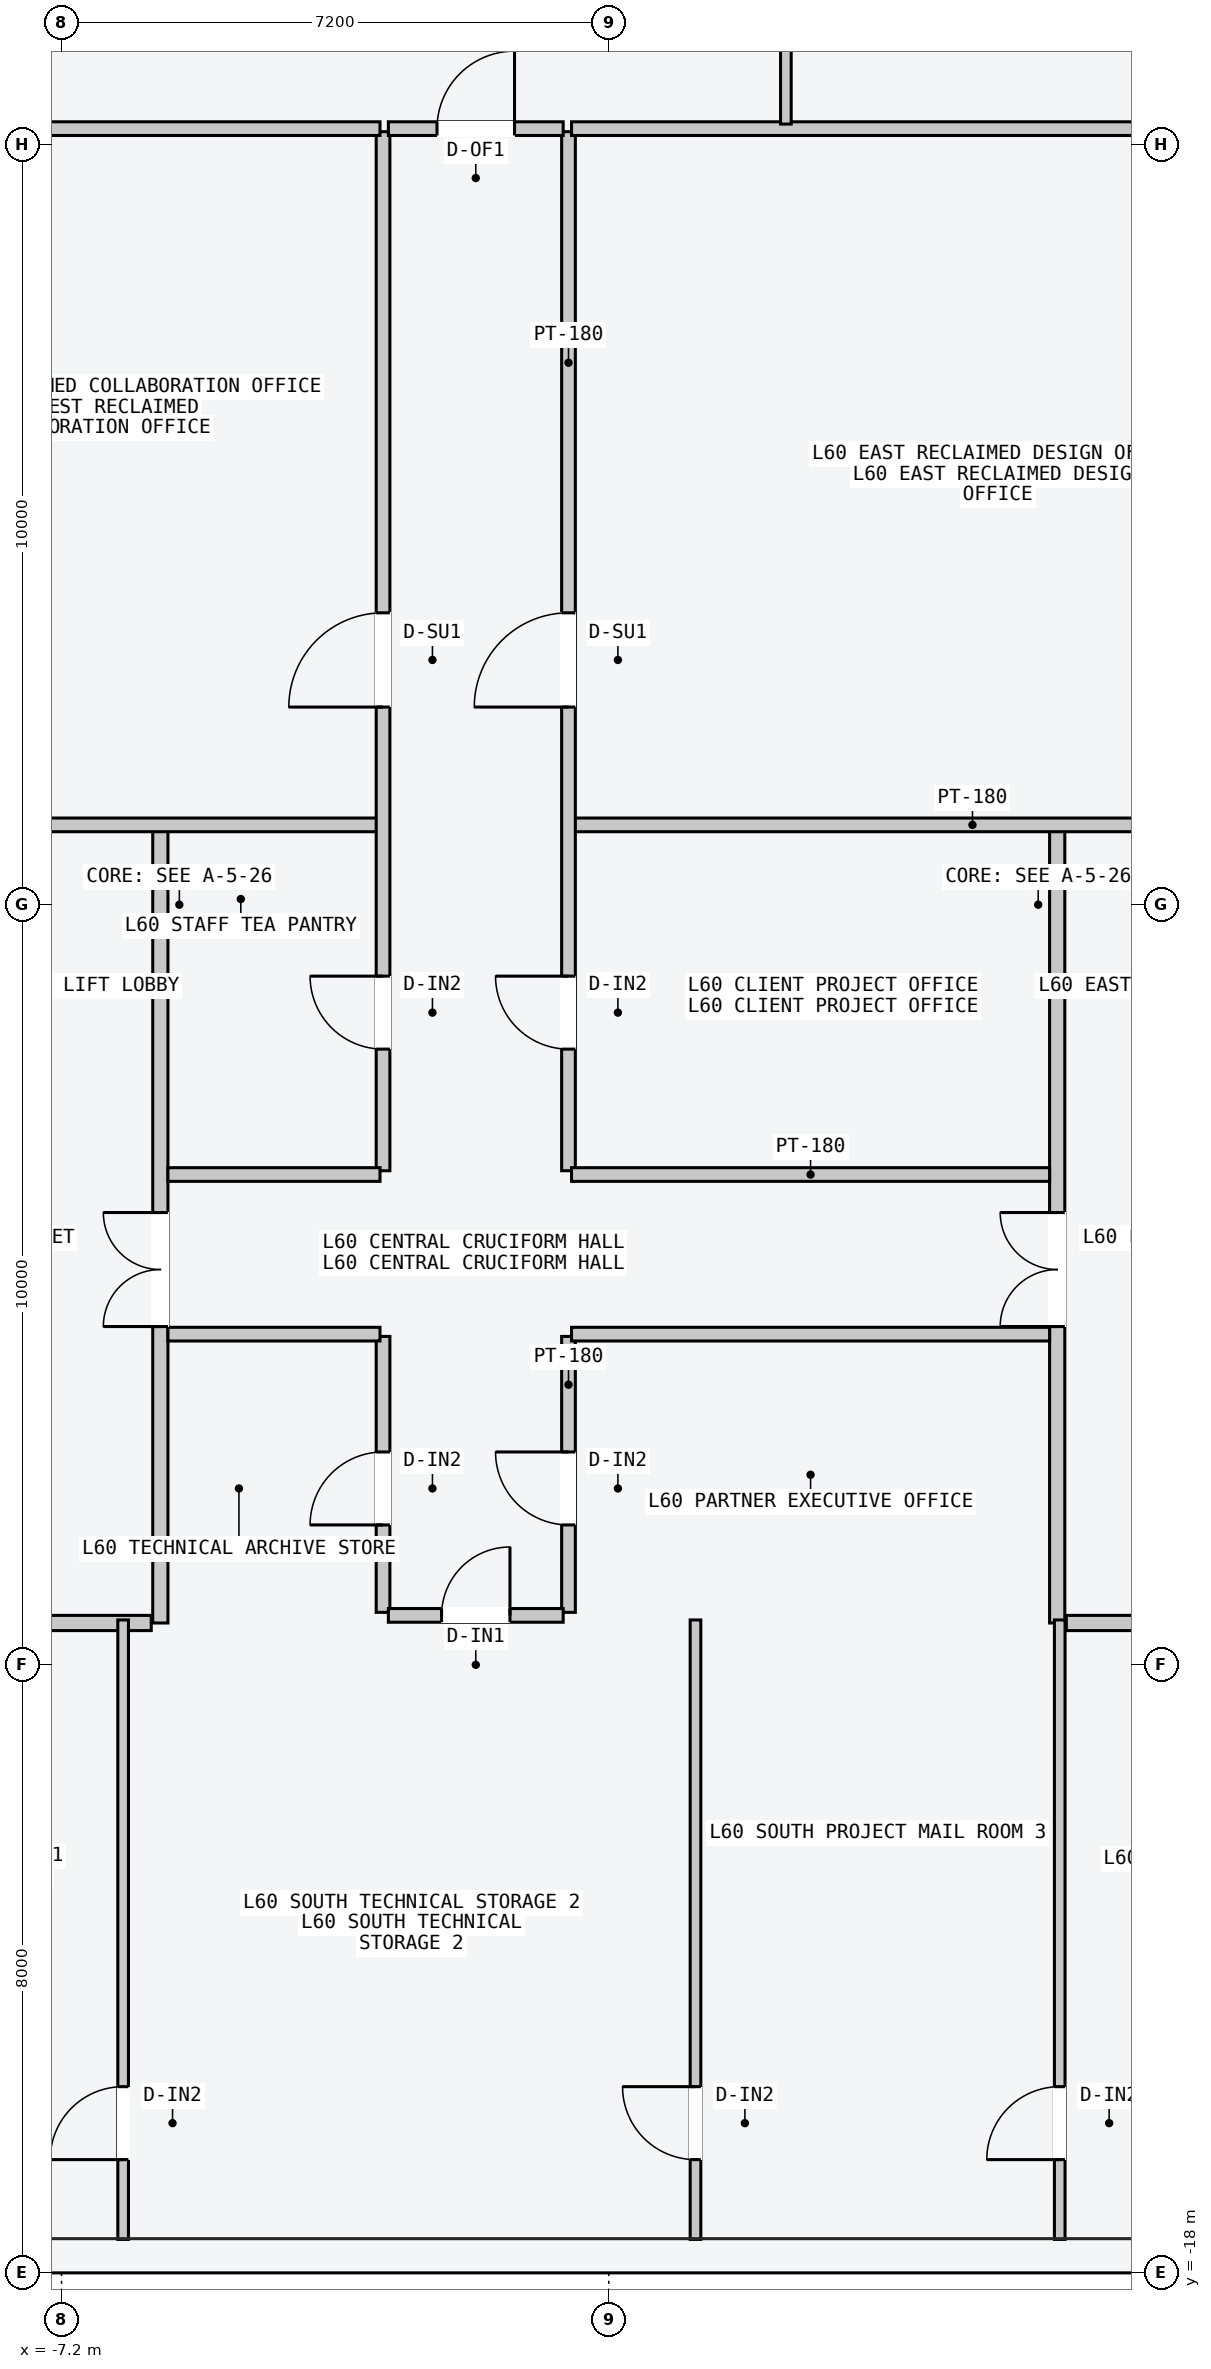
"""IFC4 building model, lengths in metres.
Left out: names, types, materials, properties, quantities, classifications, styles, units other than length and angle.
Written with IfcOpenShell. Run it as: python <this file> out.ifc"""

import sys

from ifc_helpers import new_model, si_unit, direction, frame, frame_2d, origin, place, context, subcontext, project, spatial, rectangle, extrude, element, fill, save


model = new_model("IFC4")
c1 = context("Model", 3, precision=1e-05, world=origin(), true_north=direction((0.0, 1.0)))
c2 = subcontext(c1, "Body", "Model", "MODEL_VIEW")
j1 = project(units=[si_unit("LENGTHUNIT", "METRE"), si_unit("PLANEANGLEUNIT", "RADIAN")], contexts=[c1])
p1 = place(None, origin())
s1 = spatial("IfcSite", under=j1, at=p1, CompositionType="ELEMENT")
p2 = place(p1, origin())
s2 = spatial("IfcBuilding", under=s1, at=p2, CompositionType="ELEMENT")
p3 = place(p2, frame((0.0, 0.0, 229.2)))
s3 = spatial("IfcBuildingStorey", under=s2, at=p3, CompositionType="ELEMENT", Elevation=229.2)
p4 = place(p3, frame((-5.9, -9.45, 0.0), z_axis=(0.0, 0.0, 1.0), x_axis=(0.0, 1.0, 0.0)))
e1 = element("IfcWall", 1, at=p4, inside=s3, PredefinedType="PARTITIONING", context=c2, shape_type="SweptSolid", body=[
    extrude(rectangle(XDim=10.5, YDim=0.2, at=frame_2d((5.25, 0.0))), origin(), (0.0, 0.0, 1.0), 3.4),
])
p5 = place(p4, frame((3.9, 0.0, 0.0)))
e2 = element("IfcOpeningElement", 2, at=p5, cuts=e1, PredefinedType="OPENING", context=c2, shape_type="SweptSolid", body=[
    extrude(rectangle(XDim=1.5, YDim=2.2, at=frame_2d((0.75, 1.1))), frame((0.0, 0.11, 0.0), z_axis=(0.0, -1.0, 0.0), x_axis=(1.0, 0.0, 0.0)), (0.0, 0.0, 1.0), 0.22),
])
p6 = place(p3, frame((-6.02, -9.45, 0.0), z_axis=(0.0, 0.0, 1.0), x_axis=(-1.0, 0.0, 0.0)))
e3 = element("IfcWall", 3, at=p6, inside=s3, PredefinedType="PARTITIONING", context=c2, shape_type="SweptSolid", body=[
    extrude(rectangle(XDim=1.8, YDim=0.2, at=frame_2d((0.9, 0.0))), origin(), (0.0, 0.0, 1.0), 3.4),
])
p7 = place(p3, frame((5.9, -9.45, 0.0), z_axis=(0.0, 0.0, 1.0), x_axis=(0.0, 1.0, 0.0)))
e4 = element("IfcWall", 4, at=p7, inside=s3, PredefinedType="PARTITIONING", context=c2, shape_type="SweptSolid", body=[
    extrude(rectangle(XDim=10.5, YDim=0.2, at=frame_2d((5.25, 0.0))), origin(), (0.0, 0.0, 1.0), 3.4),
])
p8 = place(p7, frame((3.9, 0.0, 0.0)))
e5 = element("IfcOpeningElement", 5, at=p8, cuts=e4, PredefinedType="OPENING", context=c2, shape_type="SweptSolid", body=[
    extrude(rectangle(XDim=1.5, YDim=2.2, at=frame_2d((0.75, 1.1))), frame((0.0, 0.11, 0.0), z_axis=(0.0, -1.0, 0.0), x_axis=(1.0, 0.0, 0.0)), (0.0, 0.0, 1.0), 0.22),
])
p9 = place(p3, frame((6.02, -9.45, 0.0), z_axis=(0.0, 0.0, 1.0), x_axis=(1.0, 0.0, 0.0)))
e6 = element("IfcWall", 6, at=p9, inside=s3, PredefinedType="PARTITIONING", context=c2, shape_type="SweptSolid", body=[
    extrude(rectangle(XDim=1.8, YDim=0.2, at=frame_2d((0.9, 0.0))), origin(), (0.0, 0.0, 1.0), 3.4),
])
p10 = place(p3, frame((-10.05, 1.05, 0.0), z_axis=(0.0, 0.0, 1.0), x_axis=(1.0, 0.0, 0.0)))
e7 = element("IfcWall", 7, at=p10, inside=s3, PredefinedType="PARTITIONING", context=c2, shape_type="SweptSolid", body=[
    extrude(rectangle(XDim=7.04, YDim=0.18, at=frame_2d((3.52, 0.0))), origin(), (0.0, 0.0, 1.0), 3.4),
])
p11 = place(p3, frame((-2.97, -3.5, 0.0), z_axis=(0.0, 0.0, 1.0), x_axis=(0.0, 1.0, 0.0)))
e8 = element("IfcWall", 8, at=p11, inside=s3, PredefinedType="PARTITIONING", context=c2, shape_type="SweptSolid", body=[
    extrude(rectangle(XDim=13.67, YDim=0.18, at=frame_2d((6.835, 0.0))), origin(), (0.0, 0.0, 1.0), 3.4),
])
p12 = place(p11, frame((6.1, 0.0, 0.0)))
e9 = element("IfcOpeningElement", 9, at=p12, cuts=e8, PredefinedType="OPENING", context=c2, shape_type="SweptSolid", body=[
    extrude(rectangle(XDim=1.24, YDim=2.24, at=frame_2d((0.62, 1.12))), frame((0.0, 0.1, 0.0), z_axis=(0.0, -1.0, 0.0), x_axis=(1.0, 0.0, 0.0)), (0.0, 0.0, 1.0), 0.2),
])
p13 = place(p11, frame((1.6, 0.0, 0.0)))
e10 = element("IfcOpeningElement", 10, at=p13, cuts=e8, PredefinedType="OPENING", context=c2, shape_type="SweptSolid", body=[
    extrude(rectangle(XDim=0.96, YDim=2.18, at=frame_2d((0.48, 1.09))), frame((0.0, 0.1, 0.0), z_axis=(0.0, -1.0, 0.0), x_axis=(1.0, 0.0, 0.0)), (0.0, 0.0, 1.0), 0.2),
])
p14 = place(p3, frame((-7.5, 10.21, 0.0), z_axis=(0.0, 0.0, 1.0), x_axis=(1.0, 0.0, 0.0)))
e11 = element("IfcWall", 11, at=p14, inside=s3, PredefinedType="PARTITIONING", context=c2, shape_type="SweptSolid", body=[
    extrude(rectangle(XDim=4.49, YDim=0.18, at=frame_2d((2.245, 0.0))), origin(), (0.0, 0.0, 1.0), 3.4),
])
p15 = place(p3, frame((-5.8, -3.55, 0.0), z_axis=(0.0, 0.0, 1.0), x_axis=(1.0, 0.0, 0.0)))
e12 = element("IfcWall", 12, at=p15, inside=s3, PredefinedType="PARTITIONING", context=c2, shape_type="SweptSolid", body=[
    extrude(rectangle(XDim=2.79, YDim=0.18, at=frame_2d((1.395, 0.0))), origin(), (0.0, 0.0, 1.0), 3.4),
])
p16 = place(p3, frame((-0.49, 1.05, 0.0), z_axis=(0.0, 0.0, 1.0), x_axis=(1.0, 0.0, 0.0)))
e13 = element("IfcWall", 13, at=p16, inside=s3, PredefinedType="PARTITIONING", context=c2, shape_type="SweptSolid", body=[
    extrude(rectangle(XDim=10.55, YDim=0.18, at=frame_2d((5.275, 0.0))), origin(), (0.0, 0.0, 1.0), 3.4),
])
p17 = place(p3, frame((-0.53, -3.5, 0.0), z_axis=(0.0, 0.0, 1.0), x_axis=(0.0, 1.0, 0.0)))
e14 = element("IfcWall", 14, at=p17, inside=s3, PredefinedType="PARTITIONING", context=c2, shape_type="SweptSolid", body=[
    extrude(rectangle(XDim=13.67, YDim=0.18, at=frame_2d((6.835, 0.0))), origin(), (0.0, 0.0, 1.0), 3.4),
])
p18 = place(p17, frame((6.1, 0.0, 0.0)))
e15 = element("IfcOpeningElement", 15, at=p18, cuts=e14, PredefinedType="OPENING", context=c2, shape_type="SweptSolid", body=[
    extrude(rectangle(XDim=1.24, YDim=2.24, at=frame_2d((0.62, 1.12))), frame((0.0, 0.1, 0.0), z_axis=(0.0, -1.0, 0.0), x_axis=(1.0, 0.0, 0.0)), (0.0, 0.0, 1.0), 0.2),
])
p19 = place(p17, frame((1.6, 0.0, 0.0)))
e16 = element("IfcOpeningElement", 16, at=p19, cuts=e14, PredefinedType="OPENING", context=c2, shape_type="SweptSolid", body=[
    extrude(rectangle(XDim=0.96, YDim=2.18, at=frame_2d((0.48, 1.09))), frame((0.0, 0.1, 0.0), z_axis=(0.0, -1.0, 0.0), x_axis=(1.0, 0.0, 0.0)), (0.0, 0.0, 1.0), 0.2),
])
p20 = place(p3, frame((-0.49, 10.21, 0.0), z_axis=(0.0, 0.0, 1.0), x_axis=(1.0, 0.0, 0.0)))
e17 = element("IfcWall", 17, at=p20, inside=s3, PredefinedType="PARTITIONING", context=c2, shape_type="SweptSolid", body=[
    extrude(rectangle(XDim=7.99, YDim=0.18, at=frame_2d((3.995, 0.0))), origin(), (0.0, 0.0, 1.0), 3.4),
])
p21 = place(p3, frame((-0.49, -3.55, 0.0), z_axis=(0.0, 0.0, 1.0), x_axis=(1.0, 0.0, 0.0)))
e18 = element("IfcWall", 18, at=p21, inside=s3, PredefinedType="PARTITIONING", context=c2, shape_type="SweptSolid", body=[
    extrude(rectangle(XDim=6.29, YDim=0.18, at=frame_2d((3.145, 0.0))), origin(), (0.0, 0.0, 1.0), 3.4),
])
p22 = place(p3, frame((-2.97, -9.31, 0.0), z_axis=(0.0, 0.0, 1.0), x_axis=(0.0, 1.0, 0.0)))
e19 = element("IfcWall", 19, at=p22, inside=s3, PredefinedType="PARTITIONING", context=c2, shape_type="SweptSolid", body=[
    extrude(rectangle(XDim=3.63, YDim=0.18, at=frame_2d((1.815, 0.0))), origin(), (0.0, 0.0, 1.0), 3.4),
])
p23 = place(p22, frame((1.15, 0.0, 0.0)))
e20 = element("IfcOpeningElement", 20, at=p23, cuts=e19, PredefinedType="OPENING", context=c2, shape_type="SweptSolid", body=[
    extrude(rectangle(XDim=0.96, YDim=2.18, at=frame_2d((0.48, 1.09))), frame((0.0, 0.1, 0.0), z_axis=(0.0, -1.0, 0.0), x_axis=(1.0, 0.0, 0.0)), (0.0, 0.0, 1.0), 0.2),
])
p24 = place(p3, frame((-0.53, -9.31, 0.0), z_axis=(0.0, 0.0, 1.0), x_axis=(0.0, 1.0, 0.0)))
e21 = element("IfcWall", 21, at=p24, inside=s3, PredefinedType="PARTITIONING", context=c2, shape_type="SweptSolid", body=[
    extrude(rectangle(XDim=3.63, YDim=0.18, at=frame_2d((1.815, 0.0))), origin(), (0.0, 0.0, 1.0), 3.4),
])
p25 = place(p24, frame((1.15, 0.0, 0.0)))
e22 = element("IfcOpeningElement", 22, at=p25, cuts=e21, PredefinedType="OPENING", context=c2, shape_type="SweptSolid", body=[
    extrude(rectangle(XDim=0.96, YDim=2.18, at=frame_2d((0.48, 1.09))), frame((0.0, 0.1, 0.0), z_axis=(0.0, -1.0, 0.0), x_axis=(1.0, 0.0, 0.0)), (0.0, 0.0, 1.0), 0.2),
])
p26 = place(p3, frame((-5.8, -5.65, 0.0), z_axis=(0.0, 0.0, 1.0), x_axis=(1.0, 0.0, 0.0)))
e23 = element("IfcWall", 23, at=p26, inside=s3, PredefinedType="PARTITIONING", context=c2, shape_type="SweptSolid", body=[
    extrude(rectangle(XDim=2.79, YDim=0.18, at=frame_2d((1.395, 0.0))), origin(), (0.0, 0.0, 1.0), 3.4),
])
p27 = place(p3, frame((-0.49, -5.65, 0.0), z_axis=(0.0, 0.0, 1.0), x_axis=(1.0, 0.0, 0.0)))
e24 = element("IfcWall", 24, at=p27, inside=s3, PredefinedType="PARTITIONING", context=c2, shape_type="SweptSolid", body=[
    extrude(rectangle(XDim=6.29, YDim=0.18, at=frame_2d((3.145, 0.0))), origin(), (0.0, 0.0, 1.0), 3.4),
])
p28 = place(p3, frame((2.33, 10.27, 0.0), z_axis=(0.0, 0.0, 1.0), x_axis=(0.0, 1.0, 0.0)))
e25 = element("IfcWall", 25, at=p28, inside=s3, PredefinedType="PARTITIONING", context=c2, shape_type="SweptSolid", body=[
    extrude(rectangle(XDim=6.28, YDim=0.14, at=frame_2d((3.14, 0.0))), origin(), (0.0, 0.0, 1.0), 3.4),
])
p29 = place(p28, frame((1.15, 0.0, 0.0)))
e26 = element("IfcOpeningElement", 26, at=p29, cuts=e25, PredefinedType="OPENING", context=c2, shape_type="SweptSolid", body=[
    extrude(rectangle(XDim=0.96, YDim=2.18, at=frame_2d((0.48, 1.09))), frame((0.0, 0.08, 0.0), z_axis=(0.0, -1.0, 0.0), x_axis=(1.0, 0.0, 0.0)), (0.0, 0.0, 1.0), 0.16),
])
p30 = place(p3, frame((-2.9, 10.21, 0.0), z_axis=(0.0, 0.0, 1.0), x_axis=(1.0, 0.0, 0.0)))
e27 = element("IfcWall", 27, at=p30, inside=s3, PredefinedType="PARTITIONING", context=c2, shape_type="SweptSolid", body=[
    extrude(rectangle(XDim=2.3, YDim=0.18, at=frame_2d((1.15, 0.0))), origin(), (0.0, 0.0, 1.0), 3.4),
])
p31 = place(p30, frame((0.64, 0.0, 0.0)))
e28 = element("IfcOpeningElement", 28, at=p31, cuts=e27, PredefinedType="OPENING", context=c2, shape_type="SweptSolid", body=[
    extrude(rectangle(XDim=1.02, YDim=2.2, at=frame_2d((0.51, 1.1))), frame((0.0, 0.1, 0.0), z_axis=(0.0, -1.0, 0.0), x_axis=(1.0, 0.0, 0.0)), (0.0, 0.0, 1.0), 0.2),
])
p32 = place(p3, frame((-6.39, -17.56, 0.0), z_axis=(0.0, 0.0, 1.0), x_axis=(0.0, 1.0, 0.0)))
e29 = element("IfcWall", 29, at=p32, inside=s3, PredefinedType="PARTITIONING", context=c2, shape_type="SweptSolid", body=[
    extrude(rectangle(XDim=8.15, YDim=0.14, at=frame_2d((4.075, 0.0))), origin(), (0.0, 0.0, 1.0), 3.4),
])
p33 = place(p32, frame((1.05, 0.0, 0.0)))
e30 = element("IfcOpeningElement", 30, at=p33, cuts=e29, PredefinedType="OPENING", context=c2, shape_type="SweptSolid", body=[
    extrude(rectangle(XDim=0.96, YDim=2.18, at=frame_2d((0.48, 1.09))), frame((0.0, 0.08, 0.0), z_axis=(0.0, -1.0, 0.0), x_axis=(1.0, 0.0, 0.0)), (0.0, 0.0, 1.0), 0.16),
])
p34 = place(p3, frame((1.141, -17.56, 0.0), z_axis=(0.0, 0.0, 1.0), x_axis=(0.0, 1.0, 0.0)))
e31 = element("IfcWall", 31, at=p34, inside=s3, PredefinedType="PARTITIONING", context=c2, shape_type="SweptSolid", body=[
    extrude(rectangle(XDim=8.15, YDim=0.14, at=frame_2d((4.075, 0.0))), origin(), (0.0, 0.0, 1.0), 3.4),
])
p35 = place(p34, frame((1.05, 0.0, 0.0)))
e32 = element("IfcOpeningElement", 32, at=p35, cuts=e31, PredefinedType="OPENING", context=c2, shape_type="SweptSolid", body=[
    extrude(rectangle(XDim=0.96, YDim=2.18, at=frame_2d((0.48, 1.09))), frame((0.0, 0.08, 0.0), z_axis=(0.0, -1.0, 0.0), x_axis=(1.0, 0.0, 0.0)), (0.0, 0.0, 1.0), 0.16),
])
p36 = place(p3, frame((5.933, -17.56, 0.0), z_axis=(0.0, 0.0, 1.0), x_axis=(0.0, 1.0, 0.0)))
e33 = element("IfcWall", 33, at=p36, inside=s3, PredefinedType="PARTITIONING", context=c2, shape_type="SweptSolid", body=[
    extrude(rectangle(XDim=8.15, YDim=0.14, at=frame_2d((4.075, 0.0))), origin(), (0.0, 0.0, 1.0), 3.4),
])
p37 = place(p36, frame((1.05, 0.0, 0.0)))
e34 = element("IfcOpeningElement", 34, at=p37, cuts=e33, PredefinedType="OPENING", context=c2, shape_type="SweptSolid", body=[
    extrude(rectangle(XDim=0.96, YDim=2.18, at=frame_2d((0.48, 1.09))), frame((0.0, 0.08, 0.0), z_axis=(0.0, -1.0, 0.0), x_axis=(1.0, 0.0, 0.0)), (0.0, 0.0, 1.0), 0.16),
])
p38 = place(p3, frame((-2.9, -9.35, 0.0), z_axis=(0.0, 0.0, 1.0), x_axis=(1.0, 0.0, 0.0)))
e35 = element("IfcWall", 35, at=p38, inside=s3, PredefinedType="PARTITIONING", context=c2, shape_type="SweptSolid", body=[
    extrude(rectangle(XDim=2.3, YDim=0.18, at=frame_2d((1.15, 0.0))), origin(), (0.0, 0.0, 1.0), 3.4),
])
p39 = place(p38, frame((0.7, 0.0, 0.0)))
e36 = element("IfcOpeningElement", 36, at=p39, cuts=e35, PredefinedType="OPENING", context=c2, shape_type="SweptSolid", body=[
    extrude(rectangle(XDim=0.9, YDim=2.15, at=frame_2d((0.45, 1.075))), frame((0.0, 0.1, 0.0), z_axis=(0.0, -1.0, 0.0), x_axis=(1.0, 0.0, 0.0)), (0.0, 0.0, 1.0), 0.2),
])
p40 = place(p5, origin())
e37 = element("IfcDoor", 37, at=p40, inside=s3, OperationType="DOUBLE_DOOR_SINGLE_SWING", PredefinedType="DOOR", context=c2, shape_type="SweptSolid", body=[
    extrude(rectangle(XDim=1.5, YDim=2.2, at=frame_2d((0.75, 1.1))), frame((0.0, 0.025, 0.0), z_axis=(0.0, -1.0, 0.0), x_axis=(1.0, 0.0, 0.0)), (0.0, 0.0, 1.0), 0.05),
])
fill(e2, e37)
p41 = place(p8, origin())
e38 = element("IfcDoor", 38, at=p41, inside=s3, OperationType="DOUBLE_DOOR_SINGLE_SWING", PredefinedType="DOOR", context=c2, shape_type="SweptSolid", body=[
    extrude(rectangle(XDim=1.5, YDim=2.2, at=frame_2d((0.75, 1.1))), frame((0.0, 0.025, 0.0), z_axis=(0.0, -1.0, 0.0), x_axis=(1.0, 0.0, 0.0)), (0.0, 0.0, 1.0), 0.05),
])
fill(e5, e38)
p42 = place(p12, origin())
e39 = element("IfcDoor", 39, at=p42, inside=s3, OperationType="SINGLE_SWING_LEFT", PredefinedType="DOOR", context=c2, shape_type="SweptSolid", body=[
    extrude(rectangle(XDim=1.24, YDim=2.24, at=frame_2d((0.62, 1.12))), frame((0.0, 0.025, 0.0), z_axis=(0.0, -1.0, 0.0), x_axis=(1.0, 0.0, 0.0)), (0.0, 0.0, 1.0), 0.05),
])
fill(e9, e39)
p43 = place(p13, origin())
e40 = element("IfcDoor", 40, at=p43, inside=s3, OperationType="SINGLE_SWING_RIGHT", PredefinedType="DOOR", context=c2, shape_type="SweptSolid", body=[
    extrude(rectangle(XDim=0.96, YDim=2.18, at=frame_2d((0.48, 1.09))), frame((0.0, 0.025, 0.0), z_axis=(0.0, -1.0, 0.0), x_axis=(1.0, 0.0, 0.0)), (0.0, 0.0, 1.0), 0.05),
])
fill(e10, e40)
p44 = place(p18, origin())
e41 = element("IfcDoor", 41, at=p44, inside=s3, OperationType="SINGLE_SWING_LEFT", PredefinedType="DOOR", context=c2, shape_type="SweptSolid", body=[
    extrude(rectangle(XDim=1.24, YDim=2.24, at=frame_2d((0.62, 1.12))), frame((0.0, 0.025, 0.0), z_axis=(0.0, -1.0, 0.0), x_axis=(1.0, 0.0, 0.0)), (0.0, 0.0, 1.0), 0.05),
])
fill(e15, e41)
p45 = place(p19, origin())
e42 = element("IfcDoor", 42, at=p45, inside=s3, OperationType="SINGLE_SWING_RIGHT", PredefinedType="DOOR", context=c2, shape_type="SweptSolid", body=[
    extrude(rectangle(XDim=0.96, YDim=2.18, at=frame_2d((0.48, 1.09))), frame((0.0, 0.025, 0.0), z_axis=(0.0, -1.0, 0.0), x_axis=(1.0, 0.0, 0.0)), (0.0, 0.0, 1.0), 0.05),
])
fill(e16, e42)
p46 = place(p23, origin())
e43 = element("IfcDoor", 43, at=p46, inside=s3, OperationType="SINGLE_SWING_LEFT", PredefinedType="DOOR", context=c2, shape_type="SweptSolid", body=[
    extrude(rectangle(XDim=0.96, YDim=2.18, at=frame_2d((0.48, 1.09))), frame((0.0, 0.025, 0.0), z_axis=(0.0, -1.0, 0.0), x_axis=(1.0, 0.0, 0.0)), (0.0, 0.0, 1.0), 0.05),
])
fill(e20, e43)
p47 = place(p25, origin())
e44 = element("IfcDoor", 44, at=p47, inside=s3, OperationType="SINGLE_SWING_RIGHT", PredefinedType="DOOR", context=c2, shape_type="SweptSolid", body=[
    extrude(rectangle(XDim=0.96, YDim=2.18, at=frame_2d((0.48, 1.09))), frame((0.0, 0.025, 0.0), z_axis=(0.0, -1.0, 0.0), x_axis=(1.0, 0.0, 0.0)), (0.0, 0.0, 1.0), 0.05),
])
fill(e22, e44)
p48 = place(p31, origin())
e45 = element("IfcDoor", 45, at=p48, inside=s3, OperationType="SINGLE_SWING_RIGHT", PredefinedType="DOOR", context=c2, shape_type="SweptSolid", body=[
    extrude(rectangle(XDim=1.02, YDim=2.2, at=frame_2d((0.51, 1.1))), frame((0.0, 0.025, 0.0), z_axis=(0.0, -1.0, 0.0), x_axis=(1.0, 0.0, 0.0)), (0.0, 0.0, 1.0), 0.05),
])
fill(e28, e45)
p49 = place(p33, origin())
e46 = element("IfcDoor", 46, at=p49, inside=s3, OperationType="SINGLE_SWING_LEFT", PredefinedType="DOOR", context=c2, shape_type="SweptSolid", body=[
    extrude(rectangle(XDim=0.96, YDim=2.18, at=frame_2d((0.48, 1.09))), frame((0.0, 0.025, 0.0), z_axis=(0.0, -1.0, 0.0), x_axis=(1.0, 0.0, 0.0)), (0.0, 0.0, 1.0), 0.05),
])
fill(e30, e46)
p50 = place(p35, origin())
e47 = element("IfcDoor", 47, at=p50, inside=s3, OperationType="SINGLE_SWING_RIGHT", PredefinedType="DOOR", context=c2, shape_type="SweptSolid", body=[
    extrude(rectangle(XDim=0.96, YDim=2.18, at=frame_2d((0.48, 1.09))), frame((0.0, 0.025, 0.0), z_axis=(0.0, -1.0, 0.0), x_axis=(1.0, 0.0, 0.0)), (0.0, 0.0, 1.0), 0.05),
])
fill(e32, e47)
p51 = place(p37, origin())
e48 = element("IfcDoor", 48, at=p51, inside=s3, OperationType="SINGLE_SWING_LEFT", PredefinedType="DOOR", context=c2, shape_type="SweptSolid", body=[
    extrude(rectangle(XDim=0.96, YDim=2.18, at=frame_2d((0.48, 1.09))), frame((0.0, 0.025, 0.0), z_axis=(0.0, -1.0, 0.0), x_axis=(1.0, 0.0, 0.0)), (0.0, 0.0, 1.0), 0.05),
])
fill(e34, e48)
p52 = place(p39, origin())
e49 = element("IfcDoor", 49, at=p52, inside=s3, OperationType="SINGLE_SWING_RIGHT", PredefinedType="DOOR", context=c2, shape_type="SweptSolid", body=[
    extrude(rectangle(XDim=0.9, YDim=2.15, at=frame_2d((0.45, 1.075))), frame((0.0, 0.025, 0.0), z_axis=(0.0, -1.0, 0.0), x_axis=(1.0, 0.0, 0.0)), (0.0, 0.0, 1.0), 0.05),
])
fill(e36, e49)
save(model, sys.argv[1])
